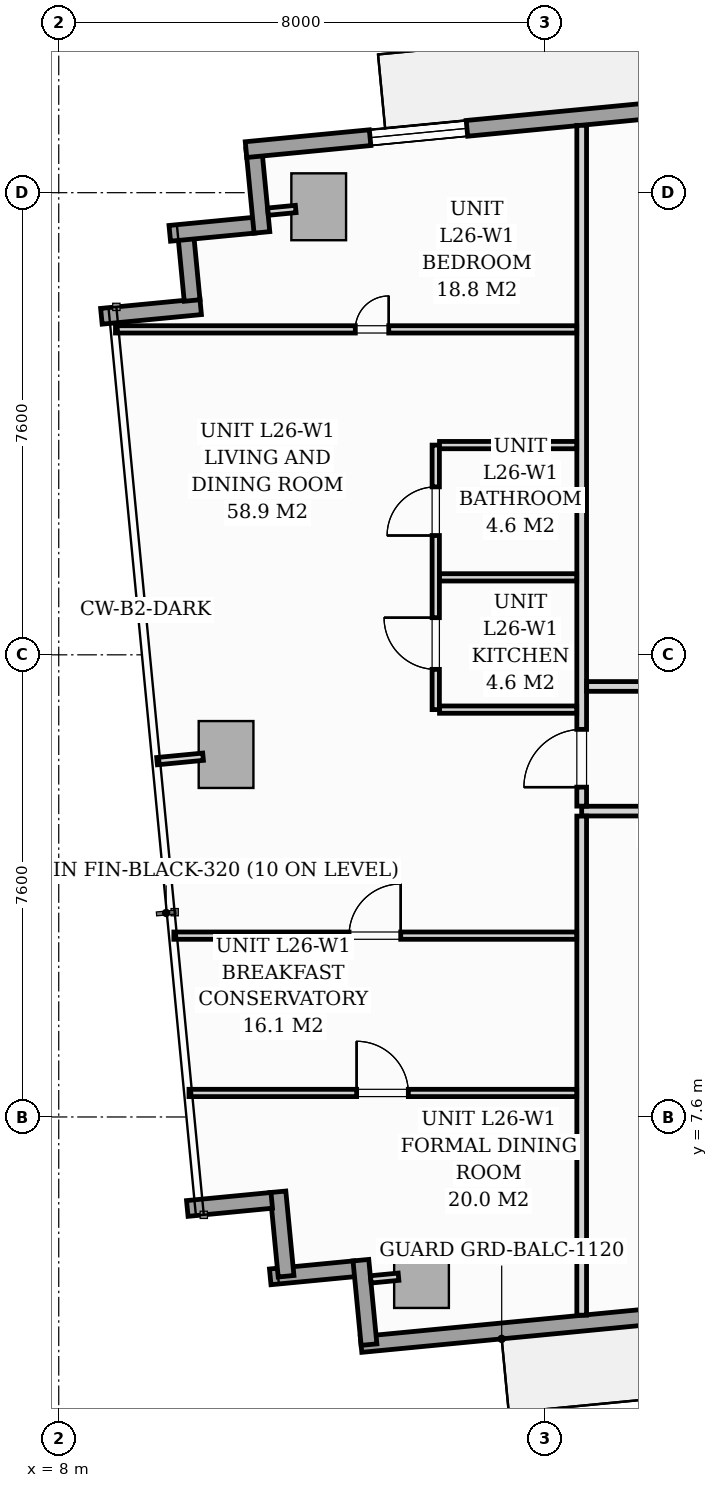
"""IFC4 building model, lengths in metres.
Left out: names, types, materials, properties, quantities, classifications, styles, units other than length and angle.
Written with IfcOpenShell. Run it as: python <this file> out.ifc"""

import sys

from ifc_helpers import new_model, si_unit, direction, frame, frame_2d, origin, origin_2d, place, context, subcontext, project, spatial, rectangle, extrude, source, transform, mapped, element, fill, save


model = new_model("IFC4")
c1 = context("Model", 3, precision=1e-05, world=origin(), true_north=direction((0.0, 1.0)))
c2 = subcontext(c1, "Body", "Model", "MODEL_VIEW")
j1 = project(units=[si_unit("LENGTHUNIT", "METRE"), si_unit("PLANEANGLEUNIT", "RADIAN")], contexts=[c1])
p1 = place(None, origin())
s1 = spatial("IfcSite", under=j1, at=p1, CompositionType="ELEMENT")
p2 = place(p1, origin())
s2 = spatial("IfcBuilding", under=s1, at=p2, CompositionType="ELEMENT")
p3 = place(p2, frame((0.0, 0.0, 93.8)))
s3 = spatial("IfcBuildingStorey", under=s2, at=p3, CompositionType="ELEMENT", Elevation=93.8)
m1 = source(origin(), c2, "Body", "SweptSolid", [
    extrude(rectangle(XDim=0.9, YDim=1.1, at=origin_2d()), origin(), (0.0, 0.0, 1.0), 3.196),
])
for number, where, z_axis, x_axis in (
    (1, (13.966, 5.01, 0.002), (0.0, 0.0, 1.0), (0.995, 0.096, 0.0)),
    (2, (12.275, 22.568, 0.002), (0.0, 0.0, 1.0), (0.995, 0.096, 0.0)),
    (3, (10.752, 13.561, 0.002), (0.0, 0.0, 1.0), (0.995, 0.096, 0.0)),
):
    element("IfcColumn", number, at=place(p3, frame(where, z_axis=z_axis, x_axis=x_axis)), inside=s3, PredefinedType="COLUMN", context=c2, shape_type="MappedRepresentation", body=[
        mapped(m1, transform((0.0, 0.0, 0.0), scale=1.0)),
    ])
for number, where, z_axis, x_axis in (
    (4, (12.867, 5.104, 0.0), (0.0, 0.0, 1.0), (-0.995, -0.096, 0.0)),
    (5, (11.739, 4.981, 0.0), (0.0, 0.0, 1.0), (-0.096, 0.995, 0.0)),
):
    element("IfcWall", number, at=place(p3, frame(where, z_axis=z_axis, x_axis=x_axis)), inside=s3, PredefinedType="STANDARD", context=c2, shape_type="SweptSolid", body=[
        extrude(rectangle(XDim=1.395, YDim=0.26, at=frame_2d((0.697, 0.0))), origin(), (0.0, 0.0, 1.0), 2.94),
    ])
p4 = place(p3, frame((11.503, 6.229, 0.0), z_axis=(0.0, 0.0, 1.0), x_axis=(-0.995391056452, -0.09589913835, 0.0)))
e6 = element("IfcWall", 6, at=p4, inside=s3, PredefinedType="STANDARD", context=c2, shape_type="SweptSolid", body=[
    extrude(rectangle(XDim=1.395, YDim=0.26, at=frame_2d((0.698, 0.0))), origin(), (0.0, 0.0, 1.0), 2.94),
])
p5 = place(p3, frame((8.701, 20.767, 0.0), z_axis=(0.0, 0.0, 1.0), x_axis=(0.995394563142, 0.095862733462, 0.0)))
e7 = element("IfcWall", 7, at=p5, inside=s3, PredefinedType="STANDARD", context=c2, shape_type="SweptSolid", body=[
    extrude(rectangle(XDim=1.64, YDim=0.26, at=frame_2d((0.82, 0.0))), origin(), (0.0, 0.0, 1.0), 2.94),
])
p6 = place(p3, frame((10.193, 21.027, 0.0), z_axis=(0.0, 0.0, 1.0), x_axis=(-0.095740721699, 0.995406306092, 0.0)))
e8 = element("IfcWall", 8, at=p6, inside=s3, PredefinedType="STANDARD", context=c2, shape_type="SweptSolid", body=[
    extrude(rectangle(XDim=1.15, YDim=0.26, at=frame_2d((0.575, 0.0))), origin(), (0.0, 0.0, 1.0), 2.94),
])
p7 = place(p3, frame((9.826, 22.131, 0.0), z_axis=(0.0, 0.0, 1.0), x_axis=(0.995389446633, 0.095915846097, 0.0)))
e9 = element("IfcWall", 9, at=p7, inside=s3, PredefinedType="STANDARD", context=c2, shape_type="SweptSolid", body=[
    extrude(rectangle(XDim=1.395, YDim=0.26, at=frame_2d((0.697, 0.0))), origin(), (0.0, 0.0, 1.0), 2.94),
])
p8 = place(p3, frame((11.341, 22.147, 0.0), z_axis=(0.0, 0.0, 1.0), x_axis=(-0.09589913835, 0.995391056452, 0.0)))
e10 = element("IfcWall", 10, at=p8, inside=s3, PredefinedType="STANDARD", context=c2, shape_type="SweptSolid", body=[
    extrude(rectangle(XDim=1.395, YDim=0.26, at=frame_2d((0.698, 0.0))), origin(), (0.0, 0.0, 1.0), 2.94),
])
p9 = place(p3, frame((11.08, 23.508, 0.0), z_axis=(0.0, 0.0, 1.0), x_axis=(0.995396638587, 0.095841180552, 0.0)))
e11 = element("IfcWall", 11, at=p9, inside=s3, PredefinedType="STANDARD", context=c2, shape_type="SweptSolid", body=[
    extrude(rectangle(XDim=19.11, YDim=0.26, at=frame_2d((9.555, 0.0))), origin(), (0.0, 0.0, 1.0), 2.94),
])
p10 = place(p9, frame((8.251, 0.0, 0.0)))
e12 = element("IfcOpeningElement", 12, at=p10, cuts=e11, PredefinedType="OPENING", context=c2, shape_type="SweptSolid", body=[
    extrude(rectangle(XDim=1.8, YDim=2.06, at=frame_2d((0.9, 1.03))), frame((0.0, 0.14, 0.0), z_axis=(0.0, -1.0, 0.0), x_axis=(1.0, 0.0, 0.0)), (0.0, 0.0, 1.0), 0.28),
])
p11 = place(p9, frame((2.05, 0.0, 0.65)))
e13 = element("IfcOpeningElement", 13, at=p11, cuts=e11, PredefinedType="OPENING", context=c2, shape_type="SweptSolid", body=[
    extrude(rectangle(XDim=1.6, YDim=1.5, at=frame_2d((0.8, 0.75))), frame((0.0, 0.14, 0.0), z_axis=(0.0, -1.0, 0.0), x_axis=(1.0, 0.0, 0.0)), (0.0, 0.0, 1.0), 0.28),
])
p12 = place(p3, frame((31.994, 5.69, 0.0), z_axis=(0.0, 0.0, 1.0), x_axis=(-0.995396521236, -0.095842399342, 0.0)))
e14 = element("IfcWall", 14, at=p12, inside=s3, PredefinedType="STANDARD", context=c2, shape_type="SweptSolid", body=[
    extrude(rectangle(XDim=19.11, YDim=0.26, at=frame_2d((9.555, 0.0))), origin(), (0.0, 0.0, 1.0), 2.94),
])
p13 = place(p12, frame((7.63, 0.0, 0.0)))
e15 = element("IfcOpeningElement", 15, at=p13, cuts=e14, PredefinedType="OPENING", context=c2, shape_type="SweptSolid", body=[
    extrude(rectangle(XDim=1.8, YDim=2.06, at=frame_2d((0.9, 1.03))), frame((0.0, 0.14, 0.0), z_axis=(0.0, -1.0, 0.0), x_axis=(1.0, 0.0, 0.0)), (0.0, 0.0, 1.0), 0.28),
])
p14 = place(p12, frame((0.7, 0.0, 0.65)))
e16 = element("IfcOpeningElement", 16, at=p14, cuts=e14, PredefinedType="OPENING", context=c2, shape_type="SweptSolid", body=[
    extrude(rectangle(XDim=1.6, YDim=1.5, at=frame_2d((0.8, 0.75))), frame((0.0, 0.14, 0.0), z_axis=(0.0, -1.0, 0.0), x_axis=(1.0, 0.0, 0.0)), (0.0, 0.0, 1.0), 0.28),
])
p15 = place(p12, frame((5.167, 0.0, 0.75)))
e17 = element("IfcOpeningElement", 17, at=p15, cuts=e14, PredefinedType="OPENING", context=c2, shape_type="SweptSolid", body=[
    extrude(rectangle(XDim=1.6, YDim=1.5, at=frame_2d((0.8, 0.75))), frame((0.0, 0.14, 0.0), z_axis=(0.0, -1.0, 0.0), x_axis=(1.0, 0.0, 0.0)), (0.0, 0.0, 1.0), 0.28),
])
p16 = place(p3, frame((13.103, 3.856, 0.0), z_axis=(0.0, 0.0, 1.0), x_axis=(-0.09589913835, 0.995391056452, 0.0)))
e18 = element("IfcWall", 18, at=p16, inside=s3, PredefinedType="STANDARD", context=c2, shape_type="SweptSolid", body=[
    extrude(rectangle(XDim=1.395, YDim=0.26, at=frame_2d((0.698, 0.0))), origin(), (0.0, 0.0, 1.0), 2.94),
])
p17 = place(p3, frame((16.6, 12.63, 0.0), z_axis=(0.0, 0.0, 1.0), x_axis=(1.0, 0.0, 0.0)))
e19 = element("IfcWall", 19, at=p17, inside=s3, PredefinedType="PARTITIONING", context=c2, shape_type="SweptSolid", body=[
    extrude(rectangle(XDim=37.6, YDim=0.16, at=frame_2d((18.8, 0.0))), origin(), (0.0, 0.0, 1.0), 2.94),
])
p18 = place(p17, frame((1.626, 0.0, 0.0)))
e20 = element("IfcOpeningElement", 20, at=p18, cuts=e19, PredefinedType="OPENING", context=c2, shape_type="SweptSolid", body=[
    extrude(rectangle(XDim=0.95, YDim=2.06, at=frame_2d((0.475, 1.03))), frame((0.0, 0.09, 0.0), z_axis=(0.0, -1.0, 0.0), x_axis=(1.0, 0.0, 0.0)), (0.0, 0.0, 1.0), 0.18),
])
p19 = place(p17, frame((13.46, 0.0, 0.0)))
e21 = element("IfcOpeningElement", 21, at=p19, cuts=e19, PredefinedType="OPENING", context=c2, shape_type="SweptSolid", body=[
    extrude(rectangle(XDim=0.95, YDim=2.06, at=frame_2d((0.475, 1.03))), frame((0.0, 0.09, 0.0), z_axis=(0.0, -1.0, 0.0), x_axis=(1.0, 0.0, 0.0)), (0.0, 0.0, 1.0), 0.18),
])
p20 = place(p17, frame((26.522, 0.0, 0.0)))
e22 = element("IfcOpeningElement", 22, at=p20, cuts=e19, PredefinedType="OPENING", context=c2, shape_type="SweptSolid", body=[
    extrude(rectangle(XDim=0.95, YDim=2.06, at=frame_2d((0.475, 1.03))), frame((0.0, 0.09, 0.0), z_axis=(0.0, -1.0, 0.0), x_axis=(1.0, 0.0, 0.0)), (0.0, 0.0, 1.0), 0.18),
])
p21 = place(p3, frame((16.6, 4.341, 0.0), z_axis=(0.0, 0.0, 1.0), x_axis=(0.0, 1.0, 0.0)))
e23 = element("IfcWall", 23, at=p21, inside=s3, PredefinedType="PARTITIONING", context=c2, shape_type="SweptSolid", body=[
    extrude(rectangle(XDim=8.207, YDim=0.16, at=frame_2d((4.104, 0.0))), origin(), (0.0, 0.0, 1.0), 2.94),
])
p22 = place(p3, frame((16.6, 12.712, 0.0), z_axis=(0.0, 0.0, 1.0), x_axis=(0.0, 1.0, 0.0)))
e24 = element("IfcWall", 24, at=p22, inside=s3, PredefinedType="PARTITIONING", context=c2, shape_type="SweptSolid", body=[
    extrude(rectangle(XDim=11.195, YDim=0.16, at=frame_2d((5.598, 0.0))), origin(), (0.0, 0.0, 1.0), 2.94),
])
p23 = place(p22, frame((0.312, 0.0, 0.0)))
e25 = element("IfcOpeningElement", 25, at=p23, cuts=e24, PredefinedType="OPENING", context=c2, shape_type="SweptSolid", body=[
    extrude(rectangle(XDim=0.95, YDim=2.06, at=frame_2d((0.475, 1.03))), frame((0.0, 0.09, 0.0), z_axis=(0.0, -1.0, 0.0), x_axis=(1.0, 0.0, 0.0)), (0.0, 0.0, 1.0), 0.18),
])
p24 = place(p3, frame((14.2, 14.299, 0.0), z_axis=(0.0, 0.0, 1.0), x_axis=(0.0, 1.0, 0.0)))
e26 = element("IfcWall", 26, at=p24, inside=s3, PredefinedType="PARTITIONING", context=c2, shape_type="SweptSolid", body=[
    extrude(rectangle(XDim=4.35, YDim=0.12, at=frame_2d((2.175, 0.0))), origin(), (0.0, 0.0, 1.0), 2.94),
])
p25 = place(p24, frame((0.662, 0.0, 0.0)))
e27 = element("IfcOpeningElement", 27, at=p25, cuts=e26, PredefinedType="OPENING", context=c2, shape_type="SweptSolid", body=[
    extrude(rectangle(XDim=0.85, YDim=2.05, at=frame_2d((0.425, 1.025))), frame((0.0, 0.07, 0.0), z_axis=(0.0, -1.0, 0.0), x_axis=(1.0, 0.0, 0.0)), (0.0, 0.0, 1.0), 0.14),
])
p26 = place(p24, frame((2.863, 0.0, 0.0)))
e28 = element("IfcOpeningElement", 28, at=p26, cuts=e26, PredefinedType="OPENING", context=c2, shape_type="SweptSolid", body=[
    extrude(rectangle(XDim=0.8, YDim=2.02, at=frame_2d((0.4, 1.01))), frame((0.0, 0.07, 0.0), z_axis=(0.0, -1.0, 0.0), x_axis=(1.0, 0.0, 0.0)), (0.0, 0.0, 1.0), 0.14),
])
p27 = place(p3, frame((14.262, 16.474, 0.0), z_axis=(0.0, 0.0, 1.0), x_axis=(1.0, 0.0, 0.0)))
e29 = element("IfcWall", 29, at=p27, inside=s3, PredefinedType="PARTITIONING", context=c2, shape_type="SweptSolid", body=[
    extrude(rectangle(XDim=2.256, YDim=0.12, at=frame_2d((1.128, 0.0))), origin(), (0.0, 0.0, 1.0), 2.94),
])
p28 = place(p3, frame((14.262, 14.299, 0.0), z_axis=(0.0, 0.0, 1.0), x_axis=(1.0, 0.0, 0.0)))
e30 = element("IfcWall", 30, at=p28, inside=s3, PredefinedType="PARTITIONING", context=c2, shape_type="SweptSolid", body=[
    extrude(rectangle(XDim=2.256, YDim=0.12, at=frame_2d((1.128, 0.0))), origin(), (0.0, 0.0, 1.0), 2.063),
])
p29 = place(p3, frame((14.262, 18.649, 0.0), z_axis=(0.0, 0.0, 1.0), x_axis=(1.0, 0.0, 0.0)))
e31 = element("IfcWall", 31, at=p29, inside=s3, PredefinedType="PARTITIONING", context=c2, shape_type="SweptSolid", body=[
    extrude(rectangle(XDim=2.256, YDim=0.12, at=frame_2d((1.128, 0.0))), origin(), (0.0, 0.0, 1.0), 2.94),
])
p30 = place(p3, frame((8.933, 20.552, 0.0), z_axis=(0.0, 0.0, 1.0), x_axis=(1.0, 0.0, 0.0)))
e32 = element("IfcWall", 32, at=p30, inside=s3, PredefinedType="PARTITIONING", context=c2, shape_type="SweptSolid", body=[
    extrude(rectangle(XDim=7.585, YDim=0.12, at=frame_2d((3.792, 0.0))), origin(), (0.0, 0.0, 1.0), 2.94),
])
p31 = place(p30, frame((3.944, 0.0, 0.0)))
e33 = element("IfcOpeningElement", 33, at=p31, cuts=e32, PredefinedType="OPENING", context=c2, shape_type="SweptSolid", body=[
    extrude(rectangle(XDim=0.55, YDim=2.0, at=frame_2d((0.275, 1.0))), frame((0.0, 0.07, 0.0), z_axis=(0.0, -1.0, 0.0), x_axis=(1.0, 0.0, 0.0)), (0.0, 0.0, 1.0), 0.14),
])
p32 = place(p3, frame((10.142, 7.995, 0.0), z_axis=(0.0, 0.0, 1.0), x_axis=(1.0, 0.0, 0.0)))
e34 = element("IfcWall", 34, at=p32, inside=s3, PredefinedType="PARTITIONING", context=c2, shape_type="SweptSolid", body=[
    extrude(rectangle(XDim=6.376, YDim=0.12, at=frame_2d((3.188, 0.0))), origin(), (0.0, 0.0, 1.0), 2.94),
])
p33 = place(p32, frame((2.757, 0.0, 0.0)))
e35 = element("IfcOpeningElement", 35, at=p33, cuts=e34, PredefinedType="OPENING", context=c2, shape_type="SweptSolid", body=[
    extrude(rectangle(XDim=0.85, YDim=2.05, at=frame_2d((0.425, 1.025))), frame((0.0, 0.07, 0.0), z_axis=(0.0, -1.0, 0.0), x_axis=(1.0, 0.0, 0.0)), (0.0, 0.0, 1.0), 0.14),
])
p34 = place(p3, frame((9.893, 10.582, 0.0), z_axis=(0.0, 0.0, 1.0), x_axis=(1.0, 0.0, 0.0)))
e36 = element("IfcWall", 36, at=p34, inside=s3, PredefinedType="PARTITIONING", context=c2, shape_type="SweptSolid", body=[
    extrude(rectangle(XDim=6.625, YDim=0.12, at=frame_2d((3.312, 0.0))), origin(), (0.0, 0.0, 1.0), 2.94),
])
p35 = place(p34, frame((2.881, 0.0, 0.0)))
e37 = element("IfcOpeningElement", 37, at=p35, cuts=e36, PredefinedType="OPENING", context=c2, shape_type="SweptSolid", body=[
    extrude(rectangle(XDim=0.85, YDim=2.05, at=frame_2d((0.425, 1.025))), frame((0.0, 0.07, 0.0), z_axis=(0.0, -1.0, 0.0), x_axis=(1.0, 0.0, 0.0)), (0.0, 0.0, 1.0), 0.14),
])
p36 = place(p3, frame((16.682, 14.68, 0.0), z_axis=(0.0, 0.0, 1.0), x_axis=(1.0, 0.0, 0.0)))
e38 = element("IfcWall", 38, at=p36, inside=s3, PredefinedType="PARTITIONING", context=c2, shape_type="SweptSolid", body=[
    extrude(rectangle(XDim=9.478, YDim=0.16, at=frame_2d((4.739, 0.0))), origin(), (0.0, 0.0, 1.0), 2.94),
])
p37 = place(p36, frame((4.163, 0.0, 0.0)))
e39 = element("IfcOpeningElement", 39, at=p37, cuts=e38, PredefinedType="OPENING", context=c2, shape_type="SweptSolid", body=[
    extrude(rectangle(XDim=0.95, YDim=2.06, at=frame_2d((0.475, 1.03))), frame((0.0, 0.09, 0.0), z_axis=(0.0, -1.0, 0.0), x_axis=(1.0, 0.0, 0.0)), (0.0, 0.0, 1.0), 0.18),
])
for number, where, z_axis, x_axis in (
    (40, (13.588, 4.973, 0.0), (0.0, 0.0, 1.0), (-0.995, -0.095, 0.0)),
    (41, (11.897, 22.532, 0.0), (0.0, 0.0, 1.0), (-0.995, -0.096, 0.0)),
):
    element("IfcWall", number, at=place(p3, frame(where, z_axis=z_axis, x_axis=x_axis)), inside=s3, PredefinedType="PARTITIONING", context=c2, shape_type="SweptSolid", body=[
        extrude(rectangle(XDim=0.458, YDim=0.12, at=frame_2d((0.229, 0.0))), origin(), (0.0, 0.0, 1.0), 2.94),
    ])
p38 = place(p3, frame((10.373, 13.524, 0.0), z_axis=(0.0, 0.0, 1.0), x_axis=(-0.995377786728, -0.096036772582, 0.0)))
e42 = element("IfcWall", 42, at=p38, inside=s3, PredefinedType="PARTITIONING", context=c2, shape_type="SweptSolid", body=[
    extrude(rectangle(XDim=0.76, YDim=0.12, at=frame_2d((0.38, 0.0))), origin(), (0.0, 0.0, 1.0), 2.94),
])
m2 = source(origin(), c2, "Body", "SweptSolid", [
    extrude(rectangle(XDim=1.6, YDim=1.5, at=frame_2d((0.8, 0.75))), frame((0.0, 0.03, 0.0), z_axis=(0.0, -1.0, 0.0), x_axis=(1.0, 0.0, 0.0)), (0.0, 0.0, 1.0), 0.06),
])
p39 = place(p11, origin())
e43 = element("IfcWindow", 43, at=p39, inside=s3, PartitioningType="SINGLE_PANEL", PredefinedType="WINDOW", context=c2, shape_type="MappedRepresentation", body=[
    mapped(m2, transform((0.0, 0.0, 0.0), scale=1.0)),
])
fill(e13, e43)
m3 = source(origin(), c2, "Body", "SweptSolid", [
    extrude(rectangle(XDim=0.95, YDim=2.06, at=frame_2d((0.475, 1.03))), frame((0.0, 0.025, 0.0), z_axis=(0.0, -1.0, 0.0), x_axis=(1.0, 0.0, 0.0)), (0.0, 0.0, 1.0), 0.05),
])
p40 = place(p23, origin())
e44 = element("IfcDoor", 44, at=p40, inside=s3, OperationType="SINGLE_SWING_LEFT", PredefinedType="DOOR", context=c2, shape_type="MappedRepresentation", body=[
    mapped(m3, transform((0.0, 0.0, 0.0), scale=1.0)),
])
fill(e25, e44)
m4 = source(origin(), c2, "Body", "SweptSolid", [
    extrude(rectangle(XDim=0.85, YDim=2.05, at=frame_2d((0.425, 1.025))), frame((0.0, 0.025, 0.0), z_axis=(0.0, -1.0, 0.0), x_axis=(1.0, 0.0, 0.0)), (0.0, 0.0, 1.0), 0.05),
])
p41 = place(p25, origin())
e45 = element("IfcDoor", 45, at=p41, inside=s3, OperationType="SINGLE_SWING_RIGHT", PredefinedType="DOOR", context=c2, shape_type="MappedRepresentation", body=[
    mapped(m4, transform((0.0, 0.0, 0.0), scale=1.0)),
])
fill(e27, e45)
m5 = source(origin(), c2, "Body", "SweptSolid", [
    extrude(rectangle(XDim=0.8, YDim=2.02, at=frame_2d((0.4, 1.01))), frame((0.0, 0.025, 0.0), z_axis=(0.0, -1.0, 0.0), x_axis=(1.0, 0.0, 0.0)), (0.0, 0.0, 1.0), 0.05),
])
p42 = place(p26, origin())
e46 = element("IfcDoor", 46, at=p42, inside=s3, OperationType="SINGLE_SWING_LEFT", PredefinedType="DOOR", context=c2, shape_type="MappedRepresentation", body=[
    mapped(m5, transform((0.0, 0.0, 0.0), scale=1.0)),
])
fill(e28, e46)
m6 = source(origin(), c2, "Body", "SweptSolid", [
    extrude(rectangle(XDim=0.55, YDim=2.0, at=frame_2d((0.275, 1.0))), frame((0.0, 0.025, 0.0), z_axis=(0.0, -1.0, 0.0), x_axis=(1.0, 0.0, 0.0)), (0.0, 0.0, 1.0), 0.05),
])
p43 = place(p31, origin())
e47 = element("IfcDoor", 47, at=p43, inside=s3, OperationType="SINGLE_SWING_RIGHT", PredefinedType="DOOR", context=c2, shape_type="MappedRepresentation", body=[
    mapped(m6, transform((0.0, 0.0, 0.0), scale=1.0)),
])
fill(e33, e47)
p44 = place(p33, origin())
e48 = element("IfcDoor", 48, at=p44, inside=s3, OperationType="SINGLE_SWING_LEFT", PredefinedType="DOOR", context=c2, shape_type="MappedRepresentation", body=[
    mapped(m4, transform((0.0, 0.0, 0.0), scale=1.0)),
])
fill(e35, e48)
p45 = place(p35, origin())
e49 = element("IfcDoor", 49, at=p45, inside=s3, OperationType="SINGLE_SWING_RIGHT", PredefinedType="DOOR", context=c2, shape_type="MappedRepresentation", body=[
    mapped(m4, transform((0.0, 0.0, 0.0), scale=1.0)),
])
fill(e37, e49)
save(model, sys.argv[1])
